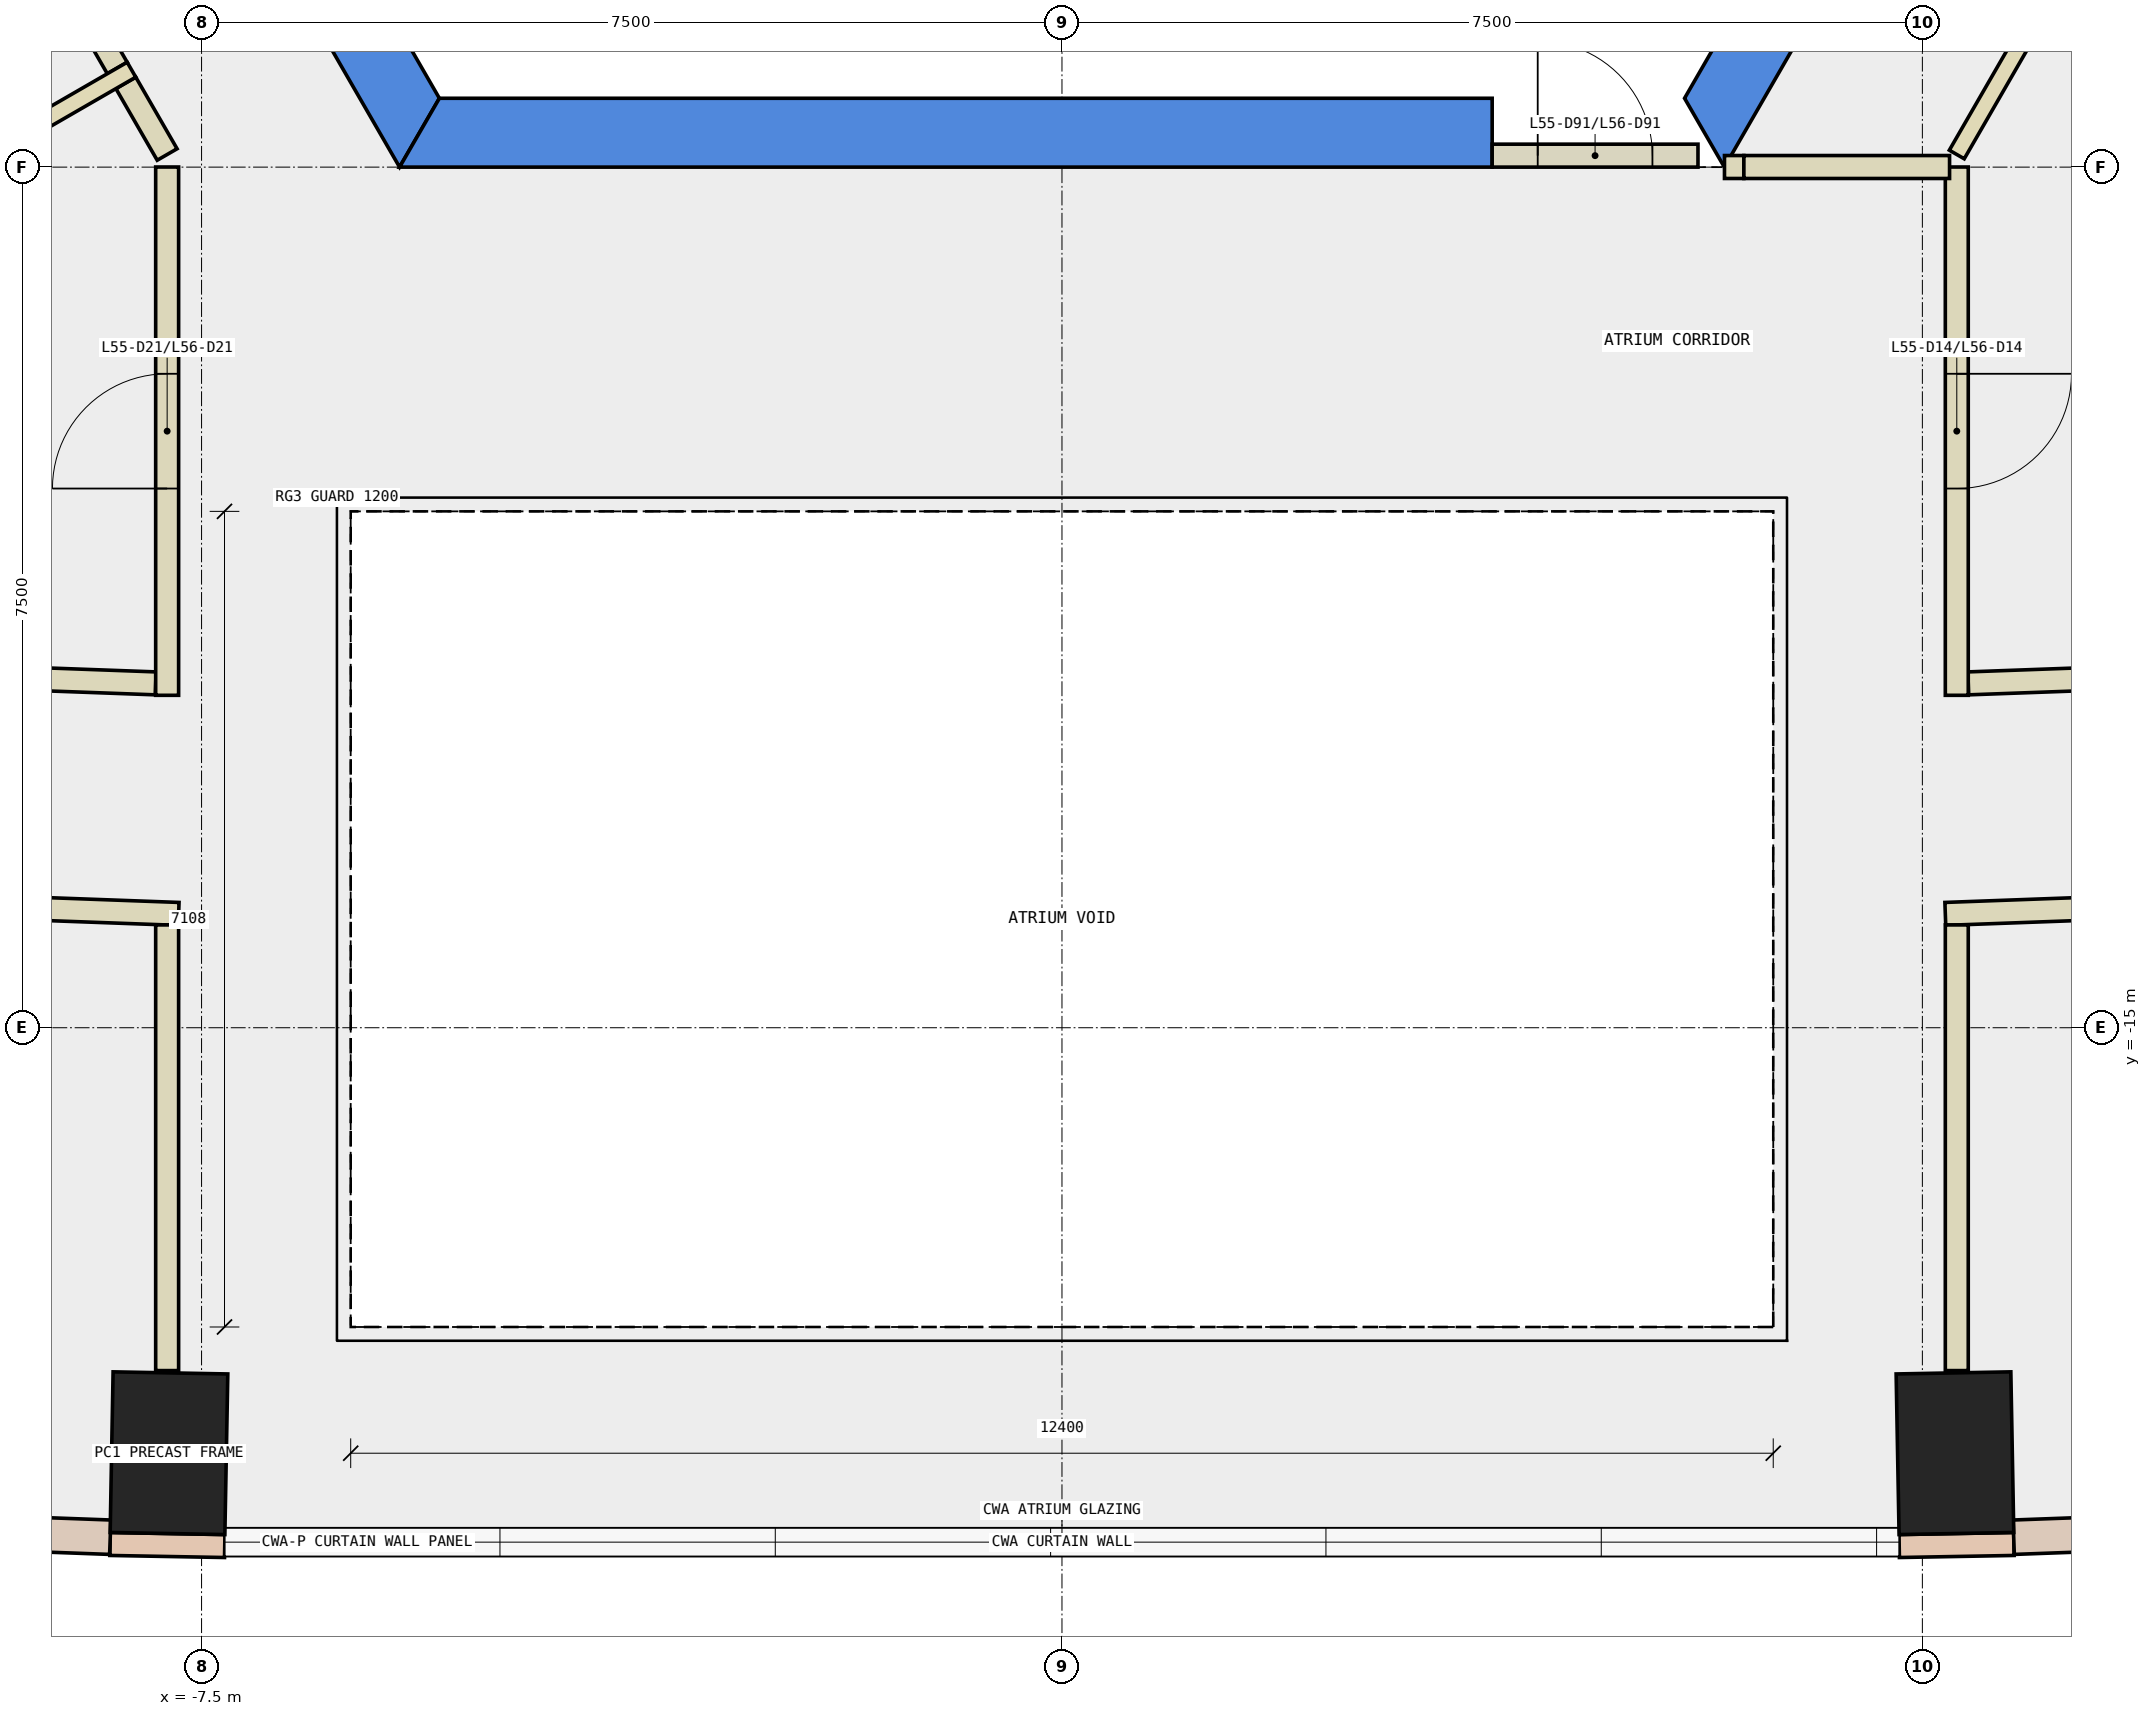
"""IFC4 building model, lengths in metres.
Left out: names, types, materials, properties, quantities, classifications, styles, units other than length and angle.
Written with IfcOpenShell. Run it as: python <this file> out.ifc"""

import sys

from ifc_helpers import new_model, si_unit, direction, frame, frame_2d, origin, origin_2d, place, context, subcontext, project, spatial, polyline, rectangle, outline, extrude, element, fill, save


model = new_model("IFC4")
c1 = context("Model", 3, precision=1e-05, world=origin(), true_north=direction((0.0, 1.0)))
c2 = subcontext(c1, "Body", "Model", "MODEL_VIEW")
j1 = project(units=[si_unit("LENGTHUNIT", "METRE"), si_unit("PLANEANGLEUNIT", "RADIAN")], contexts=[c1])
p1 = place(None, origin())
s1 = spatial("IfcSite", under=j1, at=p1, CompositionType="ELEMENT")
p2 = place(p1, origin())
s2 = spatial("IfcBuilding", under=s1, at=p2, CompositionType="ELEMENT")
p3 = place(p2, frame((0.0, 0.0, 245.0)))
s3 = spatial("IfcBuildingStorey", under=s2, at=p3, CompositionType="ELEMENT", Elevation=245.0)
for number, where, z_axis, x_axis in (
    (1, (-7.784, -18.708, -0.34), (0.0, 0.0, 1.0), (-1.0, 0.018, 0.0)),
    (2, (7.784, -18.708, -0.34), (0.0, 0.0, 1.0), (1.0, 0.018, 0.0)),
):
    element("IfcColumn", number, at=place(p3, frame(where, z_axis=z_axis, x_axis=x_axis)), inside=s3, PredefinedType="COLUMN", context=c2, shape_type="SweptSolid", body=[
        extrude(rectangle(XDim=1.0, YDim=1.4, at=origin_2d()), origin(), (0.0, 0.0, 1.0), 3.6),
    ])
p4 = place(p3, frame((0.0, 0.0, -0.34)))
e3 = element("IfcWall", 3, at=p4, inside=s3, PredefinedType="SHEAR", context=c2, shape_type="SweptSolid", body=[
    extrude(outline(polyline([(-11.547, 2.5), (-5.774, -7.5), (-5.427, -6.9), (-10.854, 2.5), (-11.547, 2.5)])), origin(), (0.0, 0.0, 1.0), 3.6),
])
p5 = place(p3, frame((0.0, 0.0, -0.34)))
e4 = element("IfcWall", 4, at=p5, inside=s3, PredefinedType="SHEAR", context=c2, shape_type="SweptSolid", body=[
    extrude(outline(polyline([(3.75, -7.5), (3.75, -6.9), (-5.427, -6.9), (-5.774, -7.5), (3.75, -7.5)])), origin(), (0.0, 0.0, 1.0), 3.6),
])
p6 = place(p3, frame((0.0, 0.0, -0.34)))
e5 = element("IfcWall", 5, at=p6, inside=s3, PredefinedType="SHEAR", context=c2, shape_type="SweptSolid", body=[
    extrude(outline(polyline([(5.774, -7.5), (11.547, 2.5), (10.854, 2.5), (5.427, -6.9), (5.774, -7.5)])), origin(), (0.0, 0.0, 1.0), 3.6),
])
for number, where, z_axis, x_axis in (
    (6, (7.578, -4.375, -0.34), (0.0, 0.0, 1.0), (0.866, -0.5, 0.0)),
    (7, (-7.578, -4.375, -0.34), (0.0, 0.0, 1.0), (-0.866, -0.5, 0.0)),
):
    element("IfcWall", number, at=place(p3, frame(where, z_axis=z_axis, x_axis=x_axis)), inside=s3, PredefinedType="SHEAR", context=c2, shape_type="SweptSolid", body=[
        extrude(rectangle(XDim=9.0, YDim=0.8, at=frame_2d((4.5, 0.0))), origin(), (0.0, 0.0, 1.0), 3.6),
    ])
for number, where, z_axis, x_axis in (
    (8, (-8.298, -19.499, 0.0), (0.0, 0.0, 1.0), (1.0, -0.018, 0.0)),
    (9, (7.298, -19.517, 0.0), (0.0, 0.0, 1.0), (1.0, 0.018, 0.0)),
):
    element("IfcWall", number, at=place(p3, frame(where, z_axis=z_axis, x_axis=x_axis)), inside=s3, PredefinedType="STANDARD", context=c2, shape_type="SweptSolid", body=[
        extrude(rectangle(XDim=1.0, YDim=0.2, at=frame_2d((0.5, 0.0))), origin(), (0.0, 0.0, 1.0), 3.26),
    ])
p7 = place(p3, frame((-15.952, -19.16, 0.0), z_axis=(0.0, 0.0, 1.0), x_axis=(0.999331753125, -0.036551979363, 0.0)))
e10 = element("IfcWall", 10, at=p7, inside=s3, PredefinedType="STANDARD", context=c2, shape_type="SweptSolid", body=[
    extrude(rectangle(XDim=7.661, YDim=0.3, at=frame_2d((3.831, 0.0))), origin(), (0.0, 0.0, 1.0), 3.26),
])
p8 = place(p7, frame((0.815, 0.0, 0.9)))
e11 = element("IfcOpeningElement", 11, at=p8, cuts=e10, PredefinedType="OPENING", context=c2, shape_type="SweptSolid", body=[
    extrude(rectangle(XDim=2.2, YDim=2.0, at=frame_2d((1.1, 1.0))), frame((0.0, 0.16, 0.0), z_axis=(0.0, -1.0, 0.0), x_axis=(1.0, 0.0, 0.0)), (0.0, 0.0, 1.0), 0.32),
])
p9 = place(p7, frame((4.646, 0.0, 0.9)))
e12 = element("IfcOpeningElement", 12, at=p9, cuts=e10, PredefinedType="OPENING", context=c2, shape_type="SweptSolid", body=[
    extrude(rectangle(XDim=2.2, YDim=2.0, at=frame_2d((1.1, 1.0))), frame((0.0, 0.16, 0.0), z_axis=(0.0, -1.0, 0.0), x_axis=(1.0, 0.0, 0.0)), (0.0, 0.0, 1.0), 0.32),
])
p10 = place(p3, frame((8.296, -19.44, 0.0), z_axis=(0.0, 0.0, 1.0), x_axis=(0.999331753125, 0.036551979363, 0.0)))
e13 = element("IfcWall", 13, at=p10, inside=s3, PredefinedType="STANDARD", context=c2, shape_type="SweptSolid", body=[
    extrude(rectangle(XDim=7.661, YDim=0.3, at=frame_2d((3.831, 0.0))), origin(), (0.0, 0.0, 1.0), 3.26),
])
p11 = place(p10, frame((0.815, 0.0, 0.9)))
e14 = element("IfcOpeningElement", 14, at=p11, cuts=e13, PredefinedType="OPENING", context=c2, shape_type="SweptSolid", body=[
    extrude(rectangle(XDim=2.2, YDim=2.0, at=frame_2d((1.1, 1.0))), frame((0.0, 0.16, 0.0), z_axis=(0.0, -1.0, 0.0), x_axis=(1.0, 0.0, 0.0)), (0.0, 0.0, 1.0), 0.32),
])
p12 = place(p10, frame((4.646, 0.0, 0.9)))
e15 = element("IfcOpeningElement", 15, at=p12, cuts=e13, PredefinedType="OPENING", context=c2, shape_type="SweptSolid", body=[
    extrude(rectangle(XDim=2.2, YDim=2.0, at=frame_2d((1.1, 1.0))), frame((0.0, 0.16, 0.0), z_axis=(0.0, -1.0, 0.0), x_axis=(1.0, 0.0, 0.0)), (0.0, 0.0, 1.0), 0.32),
])
p13 = place(p3, frame((7.9, -11.999, 0.0), z_axis=(0.0, 0.0, 1.0), x_axis=(0.999343711998, 0.036223546064, 0.0)))
e16 = element("IfcWall", 16, at=p13, inside=s3, PredefinedType="PARTITIONING", context=c2, shape_type="SweptSolid", body=[
    extrude(rectangle(XDim=2.979, YDim=0.2, at=frame_2d((1.49, 0.0))), origin(), (0.0, 0.0, 1.0), 3.26),
])
p14 = place(p3, frame((-8.235, -6.636, 0.0), z_axis=(0.0, 0.0, 1.0), x_axis=(-0.500089055364, 0.86597398154, 0.0)))
e17 = element("IfcWall", 17, at=p14, inside=s3, PredefinedType="PARTITIONING", context=c2, shape_type="SweptSolid", body=[
    extrude(rectangle(XDim=1.23, YDim=0.2, at=frame_2d((0.615, 0.0))), origin(), (0.0, 0.0, 1.0), 3.26),
])
p15 = place(p3, frame((-7.8, -7.39, 0.0), z_axis=(0.0, 0.0, 1.0), x_axis=(-0.499712670472, 0.866191230024, 0.0)))
e18 = element("IfcWall", 18, at=p15, inside=s3, PredefinedType="PARTITIONING", context=c2, shape_type="SweptSolid", body=[
    extrude(rectangle(XDim=0.72, YDim=0.2, at=frame_2d((0.36, 0.0))), origin(), (0.0, 0.0, 1.0), 3.26),
])
p16 = place(p3, frame((-11.052, -11.884, 0.0), z_axis=(0.0, 0.0, 1.0), x_axis=(0.999335249241, -0.036456270033, 0.0)))
e19 = element("IfcWall", 19, at=p16, inside=s3, PredefinedType="PARTITIONING", context=c2, shape_type="SweptSolid", body=[
    extrude(rectangle(XDim=3.154, YDim=0.2, at=frame_2d((1.577, 0.0))), origin(), (0.0, 0.0, 1.0), 3.26),
])
p17 = place(p3, frame((15.636, -13.718, 0.0), z_axis=(0.0, 0.0, 1.0), x_axis=(-0.99933282306, -0.036522715615, 0.0)))
e20 = element("IfcWall", 20, at=p17, inside=s3, PredefinedType="PARTITIONING", context=c2, shape_type="SweptSolid", body=[
    extrude(rectangle(XDim=7.941, YDim=0.2, at=frame_2d((3.971, 0.0))), origin(), (0.0, 0.0, 1.0), 3.26),
])
p18 = place(p17, frame((3.471, 0.0, 0.0)))
e21 = element("IfcOpeningElement", 21, at=p18, cuts=e20, PredefinedType="OPENING", context=c2, shape_type="SweptSolid", body=[
    extrude(rectangle(XDim=1.0, YDim=2.1, at=frame_2d((0.5, 1.05))), frame((0.0, 0.11, 0.0), z_axis=(0.0, -1.0, 0.0), x_axis=(1.0, 0.0, 0.0)), (0.0, 0.0, 1.0), 0.22),
])
p19 = place(p3, frame((-7.7, -14.008, 0.0), z_axis=(0.0, 0.0, 1.0), x_axis=(-0.99933282306, 0.036522715615, 0.0)))
e22 = element("IfcWall", 22, at=p19, inside=s3, PredefinedType="PARTITIONING", context=c2, shape_type="SweptSolid", body=[
    extrude(rectangle(XDim=7.941, YDim=0.2, at=frame_2d((3.971, 0.0))), origin(), (0.0, 0.0, 1.0), 3.26),
])
p20 = place(p19, frame((3.471, 0.0, 0.0)))
e23 = element("IfcOpeningElement", 23, at=p20, cuts=e22, PredefinedType="OPENING", context=c2, shape_type="SweptSolid", body=[
    extrude(rectangle(XDim=1.0, YDim=2.1, at=frame_2d((0.5, 1.05))), frame((0.0, 0.11, 0.0), z_axis=(0.0, -1.0, 0.0), x_axis=(1.0, 0.0, 0.0)), (0.0, 0.0, 1.0), 0.22),
])
p21 = place(p3, frame((5.775, -7.499, 0.0), z_axis=(0.0, 0.0, 1.0), x_axis=(1.0, 0.0, 0.0)))
e24 = element("IfcWall", 24, at=p21, inside=s3, PredefinedType="PARTITIONING", context=c2, shape_type="SweptSolid", body=[
    extrude(rectangle(XDim=0.169, YDim=0.2, at=frame_2d((0.084, 0.0))), origin(), (0.0, 0.0, 1.0), 2.4),
])
p22 = place(p3, frame((7.8, -7.39, 0.0), z_axis=(0.0, 0.0, 1.0), x_axis=(0.499977374825, 0.866038466041, 0.0)))
e25 = element("IfcWall", 25, at=p22, inside=s3, PredefinedType="PARTITIONING", context=c2, shape_type="SweptSolid", body=[
    extrude(rectangle(XDim=2.1, YDim=0.15, at=frame_2d((1.05, 0.0))), origin(), (0.0, 0.0, 1.0), 3.26),
])
p23 = place(p3, frame((7.8, -7.499, 0.0), z_axis=(0.0, 0.0, 1.0), x_axis=(0.0, -1.0, 0.0)))
e26 = element("IfcWall", 26, at=p23, inside=s3, PredefinedType="PARTITIONING", context=c2, shape_type="SweptSolid", body=[
    extrude(rectangle(XDim=4.604, YDim=0.2, at=frame_2d((2.302, 0.0))), origin(), (0.0, 0.0, 1.0), 3.26),
])
p24 = place(p23, frame((1.802, 0.0, 0.0)))
e27 = element("IfcOpeningElement", 27, at=p24, cuts=e26, PredefinedType="OPENING", context=c2, shape_type="SweptSolid", body=[
    extrude(rectangle(XDim=1.0, YDim=2.1, at=frame_2d((0.5, 1.05))), frame((0.0, 0.11, 0.0), z_axis=(0.0, -1.0, 0.0), x_axis=(1.0, 0.0, 0.0)), (0.0, 0.0, 1.0), 0.22),
])
p25 = place(p3, frame((-7.8, -12.103, 0.0), z_axis=(0.0, 0.0, 1.0), x_axis=(0.0, 1.0, 0.0)))
e28 = element("IfcWall", 28, at=p25, inside=s3, PredefinedType="PARTITIONING", context=c2, shape_type="SweptSolid", body=[
    extrude(rectangle(XDim=4.604, YDim=0.2, at=frame_2d((2.302, 0.0))), origin(), (0.0, 0.0, 1.0), 3.26),
])
p26 = place(p25, frame((1.802, 0.0, 0.0)))
e29 = element("IfcOpeningElement", 29, at=p26, cuts=e28, PredefinedType="OPENING", context=c2, shape_type="SweptSolid", body=[
    extrude(rectangle(XDim=1.0, YDim=2.1, at=frame_2d((0.5, 1.05))), frame((0.0, 0.11, 0.0), z_axis=(0.0, -1.0, 0.0), x_axis=(1.0, 0.0, 0.0)), (0.0, 0.0, 1.0), 0.22),
])
for number, where, z_axis, x_axis in (
    (30, (7.8, -14.104, 0.0), (0.0, 0.0, 1.0), (0.0, -1.0, 0.0)),
    (31, (-7.8, -17.988, 0.0), (0.0, 0.0, 1.0), (0.0, 1.0, 0.0)),
):
    element("IfcWall", number, at=place(p3, frame(where, z_axis=z_axis, x_axis=x_axis)), inside=s3, PredefinedType="PARTITIONING", context=c2, shape_type="SweptSolid", body=[
        extrude(rectangle(XDim=3.884, YDim=0.2, at=frame_2d((1.942, 0.0))), origin(), (0.0, 0.0, 1.0), 3.26),
    ])
p27 = place(p3, frame((-8.111, -6.651, 0.0), z_axis=(0.0, 0.0, 1.0), x_axis=(-0.865984471925, -0.50007088936, 0.0)))
e32 = element("IfcWall", 32, at=p27, inside=s3, PredefinedType="PARTITIONING", context=c2, shape_type="SweptSolid", body=[
    extrude(rectangle(XDim=5.176, YDim=0.15, at=frame_2d((2.588, 0.0))), origin(), (0.0, 0.0, 1.0), 3.26),
])
p28 = place(p3, frame((3.75, -7.4, 0.0), z_axis=(0.0, 0.0, 1.0), x_axis=(1.0, 0.0, 0.0)))
e33 = element("IfcWall", 33, at=p28, inside=s3, PredefinedType="PARTITIONING", context=c2, shape_type="SweptSolid", body=[
    extrude(rectangle(XDim=1.794, YDim=0.2, at=frame_2d((0.897, 0.0))), origin(), (0.0, 0.0, 1.0), 2.4),
])
p29 = place(p28, frame((0.397, 0.0, 0.0)))
e34 = element("IfcOpeningElement", 34, at=p29, cuts=e33, PredefinedType="OPENING", context=c2, shape_type="SweptSolid", body=[
    extrude(rectangle(XDim=1.0, YDim=2.1, at=frame_2d((0.5, 1.05))), frame((0.0, 0.11, 0.0), z_axis=(0.0, -1.0, 0.0), x_axis=(1.0, 0.0, 0.0)), (0.0, 0.0, 1.0), 0.22),
])
p30 = place(p3, frame((5.944, -7.499, 0.0), z_axis=(0.0, 0.0, 1.0), x_axis=(1.0, 0.0, 0.0)))
e35 = element("IfcWall", 35, at=p30, inside=s3, PredefinedType="PARTITIONING", context=c2, shape_type="SweptSolid", body=[
    extrude(rectangle(XDim=1.793, YDim=0.2, at=frame_2d((0.896, 0.0))), origin(), (0.0, 0.0, 1.0), 3.26),
])
p31 = place(p24, origin())
e36 = element("IfcDoor", 36, at=p31, inside=s3, OperationType="SINGLE_SWING_LEFT", PredefinedType="DOOR", context=c2, shape_type="SweptSolid", body=[
    extrude(rectangle(XDim=1.0, YDim=2.1, at=frame_2d((0.5, 1.05))), frame((0.0, 0.025, 0.0), z_axis=(0.0, -1.0, 0.0), x_axis=(1.0, 0.0, 0.0)), (0.0, 0.0, 1.0), 0.05),
])
fill(e27, e36)
p32 = place(p26, origin())
e37 = element("IfcDoor", 37, at=p32, inside=s3, OperationType="SINGLE_SWING_LEFT", PredefinedType="DOOR", context=c2, shape_type="SweptSolid", body=[
    extrude(rectangle(XDim=1.0, YDim=2.1, at=frame_2d((0.5, 1.05))), frame((0.0, 0.025, 0.0), z_axis=(0.0, -1.0, 0.0), x_axis=(1.0, 0.0, 0.0)), (0.0, 0.0, 1.0), 0.05),
])
fill(e29, e37)
p33 = place(p29, origin())
e38 = element("IfcDoor", 38, at=p33, inside=s3, OperationType="SINGLE_SWING_LEFT", PredefinedType="DOOR", context=c2, shape_type="SweptSolid", body=[
    extrude(rectangle(XDim=1.0, YDim=2.1, at=frame_2d((0.5, 1.05))), frame((0.0, 0.025, 0.0), z_axis=(0.0, -1.0, 0.0), x_axis=(1.0, 0.0, 0.0)), (0.0, 0.0, 1.0), 0.05),
])
fill(e34, e38)
save(model, sys.argv[1])
